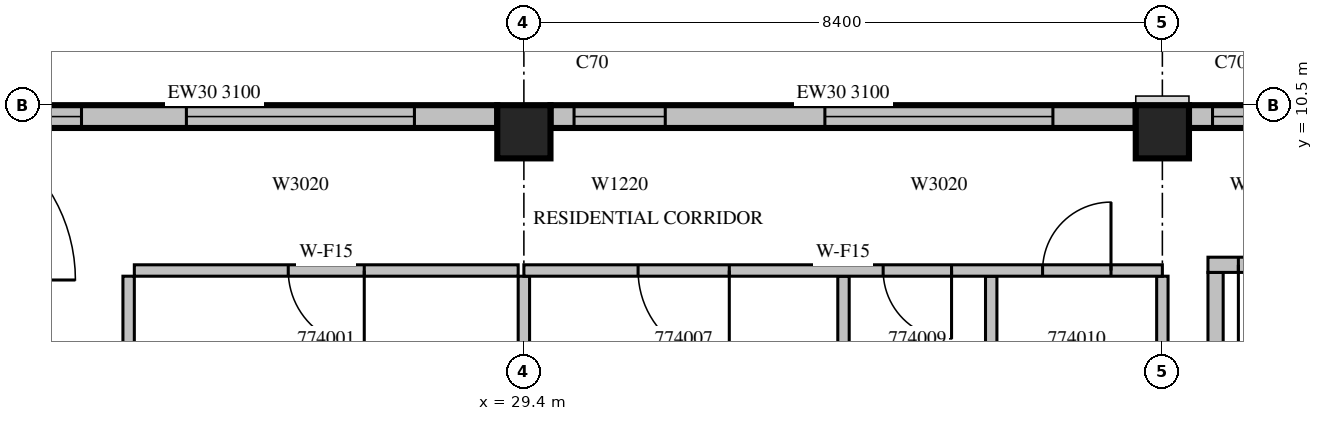
"""IFC4 building model, lengths in metres.
Left out: names, types, materials, properties, quantities, classifications, styles, units other than length and angle.
Written with IfcOpenShell. Run it as: python <this file> out.ifc"""

import sys

from ifc_helpers import new_model, si_unit, direction, frame, frame_2d, origin, origin_2d, place, context, subcontext, project, spatial, rectangle, extrude, source, transform, mapped, element, fill, save


model = new_model("IFC4")
c1 = context("Model", 3, precision=1e-05, world=origin(), true_north=direction((0.0, 1.0)))
c2 = subcontext(c1, "Body", "Model", "MODEL_VIEW")
j1 = project(units=[si_unit("LENGTHUNIT", "METRE"), si_unit("PLANEANGLEUNIT", "RADIAN")], contexts=[c1])
p1 = place(None, origin())
s1 = spatial("IfcSite", under=j1, at=p1, CompositionType="ELEMENT")
p2 = place(p1, origin())
s2 = spatial("IfcBuilding", under=s1, at=p2, CompositionType="ELEMENT")
p3 = place(p2, frame((0.0, 0.0, 319.5)))
s3 = spatial("IfcBuildingStorey", under=s2, at=p3, CompositionType="ELEMENT", Elevation=319.5)
m1 = source(origin(), c2, "Body", "SweptSolid", [
    extrude(rectangle(XDim=0.7, YDim=0.7, at=origin_2d()), origin(), (0.0, 0.0, 1.0), 3.5),
])
for number, where, z_axis, x_axis in (
    (1, (29.4, 10.15, 0.0), (0.0, 0.0, 1.0), (1.0, 0.0, 0.0)),
    (2, (37.8, 10.15, 0.0), (0.0, 0.0, 1.0), (1.0, 0.0, 0.0)),
):
    element("IfcColumn", number, at=place(p3, frame(where, z_axis=z_axis, x_axis=x_axis)), inside=s3, PredefinedType="COLUMN", context=c2, shape_type="MappedRepresentation", body=[
        mapped(m1, transform((0.0, 0.0, 0.0), scale=1.0)),
    ])
m2 = source(origin(), c2, "Body", "SweptSolid", [
    extrude(rectangle(XDim=7.7, YDim=0.3, at=frame_2d((3.85, 0.0))), origin(), (0.0, 0.0, 1.0), 3.1),
])
p4 = place(p3, frame((45.85, 10.35, 0.0), z_axis=(0.0, 0.0, 1.0), x_axis=(-1.0, 0.0, 0.0)))
e3 = element("IfcWall", 3, at=p4, inside=s3, PredefinedType="STANDARD", context=c2, shape_type="MappedRepresentation", body=[
    mapped(m2, transform((0.0, 0.0, 0.0), scale=1.0)),
])
m3 = source(origin(), c2, "Body", "SweptSolid", [
    extrude(rectangle(XDim=3.0, YDim=2.0, at=frame_2d((1.5, 1.0))), frame((0.0, 0.16, 0.0), z_axis=(0.0, -1.0, 0.0), x_axis=(1.0, 0.0, 0.0)), (0.0, 0.0, 1.0), 0.32),
])
p5 = place(p4, frame((1.09, 0.0, 0.6)))
e4 = element("IfcOpeningElement", 4, at=p5, cuts=e3, PredefinedType="OPENING", context=c2, shape_type="MappedRepresentation", body=[
    mapped(m3, transform((0.0, 0.0, 0.0), scale=1.0)),
])
m4 = source(origin(), c2, "Body", "SweptSolid", [
    extrude(rectangle(XDim=1.2, YDim=2.0, at=frame_2d((0.6, 1.0))), frame((0.0, 0.16, 0.0), z_axis=(0.0, -1.0, 0.0), x_axis=(1.0, 0.0, 0.0)), (0.0, 0.0, 1.0), 0.32),
])
p6 = place(p4, frame((6.19, 0.0, 0.6)))
e5 = element("IfcOpeningElement", 5, at=p6, cuts=e3, PredefinedType="OPENING", context=c2, shape_type="MappedRepresentation", body=[
    mapped(m4, transform((0.0, 0.0, 0.0), scale=1.0)),
])
p7 = place(p3, frame((37.45, 10.35, 0.0), z_axis=(0.0, 0.0, 1.0), x_axis=(-1.0, 0.0, 0.0)))
e6 = element("IfcWall", 6, at=p7, inside=s3, PredefinedType="STANDARD", context=c2, shape_type="MappedRepresentation", body=[
    mapped(m2, transform((0.0, 0.0, 0.0), scale=1.0)),
])
p8 = place(p7, frame((1.09, 0.0, 0.6)))
e7 = element("IfcOpeningElement", 7, at=p8, cuts=e6, PredefinedType="OPENING", context=c2, shape_type="MappedRepresentation", body=[
    mapped(m3, transform((0.0, 0.0, 0.0), scale=1.0)),
])
p9 = place(p7, frame((6.19, 0.0, 0.6)))
e8 = element("IfcOpeningElement", 8, at=p9, cuts=e6, PredefinedType="OPENING", context=c2, shape_type="MappedRepresentation", body=[
    mapped(m4, transform((0.0, 0.0, 0.0), scale=1.0)),
])
m5 = source(origin(), c2, "Body", "SweptSolid", [
    extrude(rectangle(XDim=7.45, YDim=0.3, at=frame_2d((3.725, 0.0))), origin(), (0.0, 0.0, 1.0), 3.1),
])
p10 = place(p3, frame((29.05, 10.35, 0.0), z_axis=(0.0, 0.0, 1.0), x_axis=(-1.0, 0.0, 0.0)))
e9 = element("IfcWall", 9, at=p10, inside=s3, PredefinedType="STANDARD", context=c2, shape_type="MappedRepresentation", body=[
    mapped(m5, transform((0.0, 0.0, 0.0), scale=1.0)),
])
p11 = place(p10, frame((1.09, 0.0, 0.6)))
e10 = element("IfcOpeningElement", 10, at=p11, cuts=e9, PredefinedType="OPENING", context=c2, shape_type="MappedRepresentation", body=[
    mapped(m3, transform((0.0, 0.0, 0.0), scale=1.0)),
])
m6 = source(origin(), c2, "Body", "SweptSolid", [
    extrude(rectangle(XDim=1.8, YDim=2.0, at=frame_2d((0.9, 1.0))), frame((0.0, 0.16, 0.0), z_axis=(0.0, -1.0, 0.0), x_axis=(1.0, 0.0, 0.0)), (0.0, 0.0, 1.0), 0.32),
])
p12 = place(p10, frame((5.47, 0.0, 0.6)))
e11 = element("IfcOpeningElement", 11, at=p12, cuts=e9, PredefinedType="OPENING", context=c2, shape_type="MappedRepresentation", body=[
    mapped(m6, transform((0.0, 0.0, 0.0), scale=1.0)),
])
m7 = source(origin(), c2, "Body", "SweptSolid", [
    extrude(rectangle(XDim=8.0, YDim=0.2, at=frame_2d((4.0, 0.0))), origin(), (0.0, 0.0, 1.0), 3.1),
])
p13 = place(p3, frame((38.5, 0.3, 0.0), z_axis=(0.0, 0.0, 1.0), x_axis=(0.0, 1.0, 0.0)))
e12 = element("IfcWall", 12, at=p13, inside=s3, PredefinedType="PARTITIONING", context=c2, shape_type="MappedRepresentation", body=[
    mapped(m7, transform((0.0, 0.0, 0.0), scale=1.0)),
])
m8 = source(origin(), c2, "Body", "SweptSolid", [
    extrude(rectangle(XDim=5.45, YDim=0.2, at=frame_2d((2.725, 0.0))), origin(), (0.0, 0.0, 1.0), 3.1),
])
p14 = place(p3, frame((38.4, 8.4, 0.0), z_axis=(0.0, 0.0, 1.0), x_axis=(1.0, 0.0, 0.0)))
e13 = element("IfcWall", 13, at=p14, inside=s3, PredefinedType="PARTITIONING", context=c2, shape_type="MappedRepresentation", body=[
    mapped(m8, transform((0.0, 0.0, 0.0), scale=1.0)),
])
m9 = source(origin(), c2, "Body", "SweptSolid", [
    extrude(rectangle(XDim=1.2, YDim=2.1, at=frame_2d((0.6, 1.05))), frame((0.0, 0.11, 0.0), z_axis=(0.0, -1.0, 0.0), x_axis=(1.0, 0.0, 0.0)), (0.0, 0.0, 1.0), 0.22),
])
p15 = place(p14, frame((0.4, 0.0, 0.0)))
e14 = element("IfcOpeningElement", 14, at=p15, cuts=e13, PredefinedType="OPENING", context=c2, shape_type="MappedRepresentation", body=[
    mapped(m9, transform((0.0, 0.0, 0.0), scale=1.0)),
])
m10 = source(origin(), c2, "Body", "SweptSolid", [
    extrude(rectangle(XDim=0.9, YDim=2.1, at=frame_2d((0.45, 1.05))), frame((0.0, 0.11, 0.0), z_axis=(0.0, -1.0, 0.0), x_axis=(1.0, 0.0, 0.0)), (0.0, 0.0, 1.0), 0.22),
])
p16 = place(p14, frame((3.25, 0.0, 0.0)))
e15 = element("IfcOpeningElement", 15, at=p16, cuts=e13, PredefinedType="OPENING", context=c2, shape_type="MappedRepresentation", body=[
    mapped(m10, transform((0.0, 0.0, 0.0), scale=1.0)),
])
m11 = source(origin(), c2, "Body", "SweptSolid", [
    extrude(rectangle(XDim=4.575, YDim=0.15, at=frame_2d((2.288, 0.0))), origin(), (0.0, 0.0, 1.0), 3.1),
])
p17 = place(p3, frame((24.2, 8.25, 0.0), z_axis=(0.0, 0.0, 1.0), x_axis=(0.0, -1.0, 0.0)))
e16 = element("IfcWall", 16, at=p17, inside=s3, PredefinedType="PARTITIONING", context=c2, shape_type="MappedRepresentation", body=[
    mapped(m11, transform((0.0, 0.0, 0.0), scale=1.0)),
])
m12 = source(origin(), c2, "Body", "SweptSolid", [
    extrude(rectangle(XDim=0.9, YDim=2.1, at=frame_2d((0.45, 1.05))), frame((0.0, 0.085, 0.0), z_axis=(0.0, -1.0, 0.0), x_axis=(1.0, 0.0, 0.0)), (0.0, 0.0, 1.0), 0.17),
])
p18 = place(p17, frame((2.981, 0.0, 0.0)))
e17 = element("IfcOpeningElement", 17, at=p18, cuts=e16, PredefinedType="OPENING", context=c2, shape_type="MappedRepresentation", body=[
    mapped(m12, transform((0.0, 0.0, 0.0), scale=1.0)),
])
p19 = place(p3, frame((29.4, 3.675, 0.0), z_axis=(0.0, 0.0, 1.0), x_axis=(0.0, 1.0, 0.0)))
e18 = element("IfcWall", 18, at=p19, inside=s3, PredefinedType="PARTITIONING", context=c2, shape_type="MappedRepresentation", body=[
    mapped(m11, transform((0.0, 0.0, 0.0), scale=1.0)),
])
m13 = source(origin(), c2, "Body", "SweptSolid", [
    extrude(rectangle(XDim=5.05, YDim=0.15, at=frame_2d((2.525, 0.0))), origin(), (0.0, 0.0, 1.0), 3.1),
])
p20 = place(p3, frame((29.325, 8.325, 0.0), z_axis=(0.0, 0.0, 1.0), x_axis=(-1.0, 0.0, 0.0)))
e19 = element("IfcWall", 19, at=p20, inside=s3, PredefinedType="PARTITIONING", context=c2, shape_type="MappedRepresentation", body=[
    mapped(m13, transform((0.0, 0.0, 0.0), scale=1.0)),
])
m14 = source(origin(), c2, "Body", "SweptSolid", [
    extrude(rectangle(XDim=1.0, YDim=2.1, at=frame_2d((0.5, 1.05))), frame((0.0, 0.085, 0.0), z_axis=(0.0, -1.0, 0.0), x_axis=(1.0, 0.0, 0.0)), (0.0, 0.0, 1.0), 0.17),
])
p21 = place(p20, frame((2.025, 0.0, 0.0)))
e20 = element("IfcOpeningElement", 20, at=p21, cuts=e19, PredefinedType="OPENING", context=c2, shape_type="MappedRepresentation", body=[
    mapped(m14, transform((0.0, 0.0, 0.0), scale=1.0)),
])
m15 = source(origin(), c2, "Body", "SweptSolid", [
    extrude(rectangle(XDim=3.0, YDim=0.15, at=frame_2d((1.5, 0.0))), origin(), (0.0, 0.0, 1.0), 3.1),
])
for number, where, z_axis, x_axis in (
    (21, (33.605, 5.25, 0.0), (0.0, 0.0, 1.0), (0.0, 1.0, 0.0)),
    (22, (35.548, 5.25, 0.0), (0.0, 0.0, 1.0), (0.0, 1.0, 0.0)),
    (23, (37.8, 5.25, 0.0), (0.0, 0.0, 1.0), (0.0, 1.0, 0.0)),
):
    element("IfcWall", number, at=place(p3, frame(where, z_axis=z_axis, x_axis=x_axis)), inside=s3, PredefinedType="PARTITIONING", context=c2, shape_type="MappedRepresentation", body=[
        mapped(m15, transform((0.0, 0.0, 0.0), scale=1.0)),
    ])
m16 = source(origin(), c2, "Body", "SweptSolid", [
    extrude(rectangle(XDim=8.4, YDim=0.15, at=frame_2d((4.2, 0.0))), origin(), (0.0, 0.0, 1.0), 3.1),
])
p22 = place(p3, frame((37.8, 8.325, 0.0), z_axis=(0.0, 0.0, 1.0), x_axis=(-1.0, 0.0, 0.0)))
e24 = element("IfcWall", 24, at=p22, inside=s3, PredefinedType="PARTITIONING", context=c2, shape_type="MappedRepresentation", body=[
    mapped(m16, transform((0.0, 0.0, 0.0), scale=1.0)),
])
m17 = source(origin(), c2, "Body", "SweptSolid", [
    extrude(rectangle(XDim=1.2, YDim=2.1, at=frame_2d((0.6, 1.05))), frame((0.0, 0.085, 0.0), z_axis=(0.0, -1.0, 0.0), x_axis=(1.0, 0.0, 0.0)), (0.0, 0.0, 1.0), 0.17),
])
p23 = place(p22, frame((5.698, 0.0, 0.0)))
e25 = element("IfcOpeningElement", 25, at=p23, cuts=e24, PredefinedType="OPENING", context=c2, shape_type="MappedRepresentation", body=[
    mapped(m17, transform((0.0, 0.0, 0.0), scale=1.0)),
])
p24 = place(p22, frame((2.773, 0.0, 0.0)))
e26 = element("IfcOpeningElement", 26, at=p24, cuts=e24, PredefinedType="OPENING", context=c2, shape_type="MappedRepresentation", body=[
    mapped(m12, transform((0.0, 0.0, 0.0), scale=1.0)),
])
p25 = place(p22, frame((0.676, 0.0, 0.0)))
e27 = element("IfcOpeningElement", 27, at=p25, cuts=e24, PredefinedType="OPENING", context=c2, shape_type="MappedRepresentation", body=[
    mapped(m12, transform((0.0, 0.0, 0.0), scale=1.0)),
])
m18 = source(origin(), c2, "Body", "SweptSolid", [
    extrude(rectangle(XDim=1.2, YDim=2.0, at=frame_2d((0.6, 1.0))), frame((0.0, 0.03, 0.0), z_axis=(0.0, -1.0, 0.0), x_axis=(1.0, 0.0, 0.0)), (0.0, 0.0, 1.0), 0.06),
])
p26 = place(p6, origin())
e28 = element("IfcWindow", 28, at=p26, inside=s3, PartitioningType="SINGLE_PANEL", PredefinedType="WINDOW", context=c2, shape_type="MappedRepresentation", body=[
    mapped(m18, transform((0.0, 0.0, 0.0), scale=1.0)),
])
fill(e5, e28)
m19 = source(origin(), c2, "Body", "SweptSolid", [
    extrude(rectangle(XDim=3.0, YDim=2.0, at=frame_2d((1.5, 1.0))), frame((0.0, 0.03, 0.0), z_axis=(0.0, -1.0, 0.0), x_axis=(1.0, 0.0, 0.0)), (0.0, 0.0, 1.0), 0.06),
])
p27 = place(p8, origin())
e29 = element("IfcWindow", 29, at=p27, inside=s3, PartitioningType="SINGLE_PANEL", PredefinedType="WINDOW", context=c2, shape_type="MappedRepresentation", body=[
    mapped(m19, transform((0.0, 0.0, 0.0), scale=1.0)),
])
fill(e7, e29)
p28 = place(p9, origin())
e30 = element("IfcWindow", 30, at=p28, inside=s3, PartitioningType="SINGLE_PANEL", PredefinedType="WINDOW", context=c2, shape_type="MappedRepresentation", body=[
    mapped(m18, transform((0.0, 0.0, 0.0), scale=1.0)),
])
fill(e8, e30)
p29 = place(p11, origin())
e31 = element("IfcWindow", 31, at=p29, inside=s3, PartitioningType="SINGLE_PANEL", PredefinedType="WINDOW", context=c2, shape_type="MappedRepresentation", body=[
    mapped(m19, transform((0.0, 0.0, 0.0), scale=1.0)),
])
fill(e10, e31)
m20 = source(origin(), c2, "Body", "SweptSolid", [
    extrude(rectangle(XDim=1.8, YDim=2.0, at=frame_2d((0.9, 1.0))), frame((0.0, 0.03, 0.0), z_axis=(0.0, -1.0, 0.0), x_axis=(1.0, 0.0, 0.0)), (0.0, 0.0, 1.0), 0.06),
])
p30 = place(p12, origin())
e32 = element("IfcWindow", 32, at=p30, inside=s3, PartitioningType="SINGLE_PANEL", PredefinedType="WINDOW", context=c2, shape_type="MappedRepresentation", body=[
    mapped(m20, transform((0.0, 0.0, 0.0), scale=1.0)),
])
fill(e11, e32)
m21 = source(origin(), c2, "Body", "SweptSolid", [
    extrude(rectangle(XDim=1.2, YDim=2.1, at=frame_2d((0.6, 1.05))), frame((0.0, 0.025, 0.0), z_axis=(0.0, -1.0, 0.0), x_axis=(1.0, 0.0, 0.0)), (0.0, 0.0, 1.0), 0.05),
])
p31 = place(p15, origin())
e33 = element("IfcDoor", 33, at=p31, inside=s3, OperationType="SINGLE_SWING_RIGHT", PredefinedType="DOOR", context=c2, shape_type="MappedRepresentation", body=[
    mapped(m21, transform((0.0, 0.0, 0.0), scale=1.0)),
])
fill(e14, e33)
m22 = source(origin(), c2, "Body", "SweptSolid", [
    extrude(rectangle(XDim=1.0, YDim=2.1, at=frame_2d((0.5, 1.05))), frame((0.0, 0.025, 0.0), z_axis=(0.0, -1.0, 0.0), x_axis=(1.0, 0.0, 0.0)), (0.0, 0.0, 1.0), 0.05),
])
p32 = place(p21, origin())
e34 = element("IfcDoor", 34, at=p32, inside=s3, OperationType="SINGLE_SWING_LEFT", PredefinedType="DOOR", context=c2, shape_type="MappedRepresentation", body=[
    mapped(m22, transform((0.0, 0.0, 0.0), scale=1.0)),
])
fill(e20, e34)
p33 = place(p23, origin())
e35 = element("IfcDoor", 35, at=p33, inside=s3, OperationType="SINGLE_SWING_LEFT", PredefinedType="DOOR", context=c2, shape_type="MappedRepresentation", body=[
    mapped(m21, transform((0.0, 0.0, 0.0), scale=1.0)),
])
fill(e25, e35)
m23 = source(origin(), c2, "Body", "SweptSolid", [
    extrude(rectangle(XDim=0.9, YDim=2.1, at=frame_2d((0.45, 1.05))), frame((0.0, 0.025, 0.0), z_axis=(0.0, -1.0, 0.0), x_axis=(1.0, 0.0, 0.0)), (0.0, 0.0, 1.0), 0.05),
])
p34 = place(p24, origin())
e36 = element("IfcDoor", 36, at=p34, inside=s3, OperationType="SINGLE_SWING_LEFT", PredefinedType="DOOR", context=c2, shape_type="MappedRepresentation", body=[
    mapped(m23, transform((0.0, 0.0, 0.0), scale=1.0)),
])
fill(e26, e36)
p35 = place(p25, origin())
e37 = element("IfcDoor", 37, at=p35, inside=s3, OperationType="SINGLE_SWING_RIGHT", PredefinedType="DOOR", context=c2, shape_type="MappedRepresentation", body=[
    mapped(m23, transform((0.0, 0.0, 0.0), scale=1.0)),
])
fill(e27, e37)
save(model, sys.argv[1])
